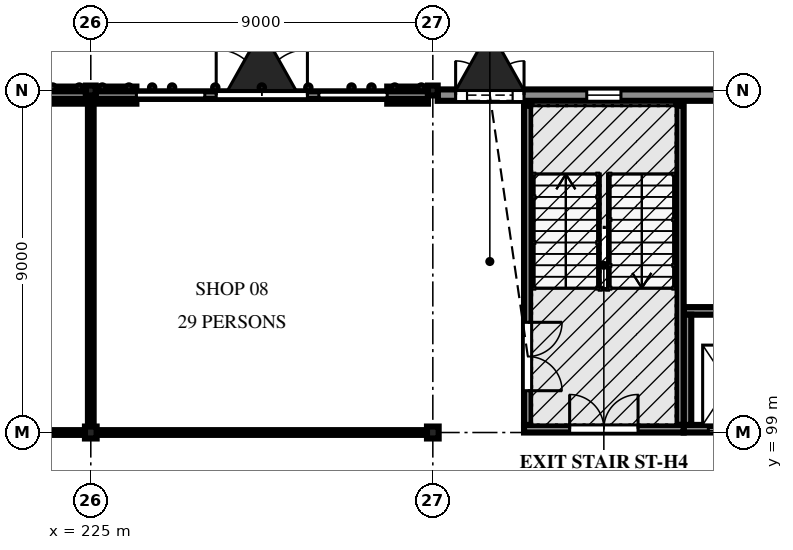
"""IFC4 building model, lengths in metres.
Left out: names, types, materials, properties, quantities, classifications, styles, units other than length and angle.
Written with IfcOpenShell. Run it as: python <this file> out.ifc"""

import sys

from ifc_helpers import new_model, si_unit, direction, frame, frame_2d, origin, origin_2d, place, context, subcontext, project, spatial, polyline, rectangle, i_section, outline, extrude, element, fill, save


model = new_model("IFC4")
c1 = context("Model", 3, precision=1e-05, world=origin(), true_north=direction((0.0, 1.0)))
c2 = subcontext(c1, "Body", "Model", "MODEL_VIEW")
j1 = project(units=[si_unit("LENGTHUNIT", "METRE"), si_unit("PLANEANGLEUNIT", "RADIAN")], contexts=[c1])
p1 = place(None, origin())
s1 = spatial("IfcSite", under=j1, at=p1, CompositionType="ELEMENT")
p2 = place(p1, origin())
s2 = spatial("IfcBuilding", under=s1, at=p2, CompositionType="ELEMENT")
p3 = place(p2, origin())
s3 = spatial("IfcBuildingStorey", under=s2, at=p3, CompositionType="ELEMENT", Elevation=0.0)
p4 = place(p3, frame((225.0, 99.0, -2.1), z_axis=(0.0, 0.0, 1.0), x_axis=(1.0, 0.0, 0.0)))
e1 = element("IfcColumn", 1, at=p4, inside=s3, PredefinedType="COLUMN", context=c2, shape_type="SweptSolid", body=[
    extrude(i_section(OverallWidth=0.307, OverallDepth=0.314, WebThickness=0.012, FlangeThickness=0.019, FilletRadius=0.015, at=origin_2d()), origin(), (0.0, 0.0, 1.0), 9.6),
])
p5 = place(p3, frame((225.0, 108.0, -2.1), z_axis=(0.0, 0.0, 1.0), x_axis=(1.0, 0.0, 0.0)))
e2 = element("IfcColumn", 2, at=p5, inside=s3, PredefinedType="COLUMN", context=c2, shape_type="SweptSolid", body=[
    extrude(i_section(OverallWidth=0.256, OverallDepth=0.26, WebThickness=0.01, FlangeThickness=0.017, FilletRadius=0.013, at=origin_2d()), origin(), (0.0, 0.0, 1.0), 9.6),
])
p6 = place(p3, frame((234.0, 99.0, -2.1), z_axis=(0.0, 0.0, 1.0), x_axis=(1.0, 0.0, 0.0)))
e3 = element("IfcColumn", 3, at=p6, inside=s3, PredefinedType="COLUMN", context=c2, shape_type="SweptSolid", body=[
    extrude(i_section(OverallWidth=0.307, OverallDepth=0.314, WebThickness=0.012, FlangeThickness=0.019, FilletRadius=0.015, at=origin_2d()), origin(), (0.0, 0.0, 1.0), 9.6),
])
p7 = place(p3, frame((234.0, 108.0, -2.1), z_axis=(0.0, 0.0, 1.0), x_axis=(1.0, 0.0, 0.0)))
e4 = element("IfcColumn", 4, at=p7, inside=s3, PredefinedType="COLUMN", context=c2, shape_type="SweptSolid", body=[
    extrude(i_section(OverallWidth=0.256, OverallDepth=0.26, WebThickness=0.01, FlangeThickness=0.017, FilletRadius=0.013, at=origin_2d()), origin(), (0.0, 0.0, 1.0), 9.6),
])
p8 = place(p3, frame((223.8, 107.878, 0.0), z_axis=(0.0, 0.0, 1.0), x_axis=(1.0, 0.0, 0.0)))
e5 = element("IfcWall", 5, at=p8, inside=s3, PredefinedType="SOLIDWALL", context=c2, shape_type="SweptSolid", body=[
    extrude(rectangle(XDim=1.072, YDim=0.45, at=frame_2d((0.536, 0.0))), origin(), (0.0, 0.0, 1.0), 4.5),
])
p9 = place(p3, frame((216.128, 107.878, 4.9), z_axis=(0.0, 0.0, 1.0), x_axis=(1.0, 0.0, 0.0)))
e6 = element("IfcWall", 6, at=p9, inside=s3, PredefinedType="SOLIDWALL", context=c2, shape_type="SweptSolid", body=[
    extrude(rectangle(XDim=8.744, YDim=0.2, at=frame_2d((4.372, 0.0))), origin(), (0.0, 0.0, 1.0), 1.792),
])
p10 = place(p3, frame((225.128, 107.878, 0.0), z_axis=(0.0, 0.0, 1.0), x_axis=(1.0, 0.0, 0.0)))
e7 = element("IfcWall", 7, at=p10, inside=s3, PredefinedType="SOLIDWALL", context=c2, shape_type="SweptSolid", body=[
    extrude(rectangle(XDim=1.072, YDim=0.45, at=frame_2d((0.536, 0.0))), origin(), (0.0, 0.0, 1.0), 4.5),
])
p11 = place(p3, frame((228.0, 107.878, 0.0), z_axis=(0.0, 0.0, 1.0), x_axis=(1.0, 0.0, 0.0)))
e8 = element("IfcWall", 8, at=p11, inside=s3, PredefinedType="ELEMENTEDWALL", context=c2, shape_type="SweptSolid", body=[
    extrude(rectangle(XDim=3.0, YDim=0.15, at=frame_2d((1.5, 0.0))), origin(), (0.0, 0.0, 1.0), 4.5),
])
p12 = place(p11, frame((0.3, 0.0, 0.0)))
e9 = element("IfcOpeningElement", 9, at=p12, cuts=e8, PredefinedType="OPENING", context=c2, shape_type="SweptSolid", body=[
    extrude(rectangle(XDim=2.4, YDim=2.7, at=frame_2d((1.2, 1.35))), frame((0.0, 0.085, 0.0), z_axis=(0.0, -1.0, 0.0), x_axis=(1.0, 0.0, 0.0)), (0.0, 0.0, 1.0), 0.17),
])
p13 = place(p3, frame((232.8, 107.878, 0.0), z_axis=(0.0, 0.0, 1.0), x_axis=(1.0, 0.0, 0.0)))
e10 = element("IfcWall", 10, at=p13, inside=s3, PredefinedType="SOLIDWALL", context=c2, shape_type="SweptSolid", body=[
    extrude(rectangle(XDim=1.072, YDim=0.45, at=frame_2d((0.536, 0.0))), origin(), (0.0, 0.0, 1.0), 4.5),
])
p14 = place(p3, frame((225.128, 107.878, 4.9), z_axis=(0.0, 0.0, 1.0), x_axis=(1.0, 0.0, 0.0)))
e11 = element("IfcWall", 11, at=p14, inside=s3, PredefinedType="SOLIDWALL", context=c2, shape_type="SweptSolid", body=[
    extrude(rectangle(XDim=8.744, YDim=0.2, at=frame_2d((4.372, 0.0))), origin(), (0.0, 0.0, 1.0), 1.792),
])
p15 = place(p3, frame((234.128, 107.878, 0.0), z_axis=(0.0, 0.0, 1.0), x_axis=(1.0, 0.0, 0.0)))
e12 = element("IfcWall", 12, at=p15, inside=s3, PredefinedType="SOLIDWALL", context=c2, shape_type="SweptSolid", body=[
    extrude(rectangle(XDim=8.744, YDim=0.3, at=frame_2d((4.372, 0.0))), origin(), (0.0, 0.0, 1.0), 6.692),
])
p16 = place(p15, frame((0.472, 0.0, 0.0)))
e13 = element("IfcOpeningElement", 13, at=p16, cuts=e12, PredefinedType="OPENING", context=c2, shape_type="SweptSolid", body=[
    extrude(rectangle(XDim=1.8, YDim=2.4, at=frame_2d((0.9, 1.2))), frame((0.0, 0.16, 0.0), z_axis=(0.0, -1.0, 0.0), x_axis=(1.0, 0.0, 0.0)), (0.0, 0.0, 1.0), 0.32),
])
p17 = place(p15, frame((0.772, 0.0, 2.55)))
e14 = element("IfcOpeningElement", 14, at=p17, cuts=e12, PredefinedType="OPENING", context=c2, shape_type="SweptSolid", body=[
    extrude(rectangle(XDim=1.2, YDim=0.6, at=frame_2d((0.6, 0.3))), frame((0.0, 0.16, 0.0), z_axis=(0.0, -1.0, 0.0), x_axis=(1.0, 0.0, 0.0)), (0.0, 0.0, 1.0), 0.32),
])
p18 = place(p15, frame((3.922, 0.0, 1.2)))
e15 = element("IfcOpeningElement", 15, at=p18, cuts=e12, PredefinedType="OPENING", context=c2, shape_type="SweptSolid", body=[
    extrude(rectangle(XDim=0.9, YDim=1.8, at=frame_2d((0.45, 0.9))), frame((0.0, 0.16, 0.0), z_axis=(0.0, -1.0, 0.0), x_axis=(1.0, 0.0, 0.0)), (0.0, 0.0, 1.0), 0.32),
])
p19 = place(p3, frame((236.4, 99.1, 0.0), z_axis=(0.0, 0.0, 1.0), x_axis=(1.0, 0.0, 0.0)))
e16 = element("IfcWall", 16, at=p19, inside=s3, PredefinedType="SOLIDWALL", context=c2, shape_type="SweptSolid", body=[
    extrude(rectangle(XDim=4.2, YDim=0.2, at=frame_2d((2.1, 0.0))), origin(), (0.0, 0.0, 1.0), 6.757),
])
p20 = place(p19, frame((1.2, 0.0, 0.0)))
e17 = element("IfcOpeningElement", 17, at=p20, cuts=e16, PredefinedType="OPENING", context=c2, shape_type="SweptSolid", body=[
    extrude(rectangle(XDim=1.8, YDim=2.1, at=frame_2d((0.9, 1.05))), frame((0.0, 0.11, 0.0), z_axis=(0.0, -1.0, 0.0), x_axis=(1.0, 0.0, 0.0)), (0.0, 0.0, 1.0), 0.22),
])
p21 = place(p3, frame((236.5, 99.2, 0.0), z_axis=(0.0, 0.0, 1.0), x_axis=(0.0, 1.0, 0.0)))
e18 = element("IfcWall", 18, at=p21, inside=s3, PredefinedType="SOLIDWALL", context=c2, shape_type="SweptSolid", body=[
    extrude(rectangle(XDim=8.4, YDim=0.2, at=frame_2d((4.2, 0.0))), origin(), (0.0, 0.0, 1.0), 6.757),
])
p22 = place(p21, frame((0.9, 0.0, 0.0)))
e19 = element("IfcOpeningElement", 19, at=p22, cuts=e18, PredefinedType="OPENING", context=c2, shape_type="SweptSolid", body=[
    extrude(rectangle(XDim=1.8, YDim=2.1, at=frame_2d((0.9, 1.05))), frame((0.0, 0.11, 0.0), z_axis=(0.0, -1.0, 0.0), x_axis=(1.0, 0.0, 0.0)), (0.0, 0.0, 1.0), 0.22),
])
p23 = place(p3, frame((240.5, 99.2, 0.0), z_axis=(0.0, 0.0, 1.0), x_axis=(0.0, 1.0, 0.0)))
e20 = element("IfcWall", 20, at=p23, inside=s3, PredefinedType="SOLIDWALL", context=c2, shape_type="SweptSolid", body=[
    extrude(rectangle(XDim=8.4, YDim=0.2, at=frame_2d((4.2, 0.0))), origin(), (0.0, 0.0, 1.0), 6.757),
])
p24 = place(p3, frame((240.602, 99.1, -1.6), z_axis=(0.0, 0.0, 1.0), x_axis=(1.0, 0.0, 0.0)))
e21 = element("IfcWall", 21, at=p24, inside=s3, PredefinedType="SOLIDWALL", context=c2, shape_type="SweptSolid", body=[
    extrude(rectangle(XDim=2.398, YDim=0.2, at=frame_2d((1.199, 0.0))), origin(), (0.0, 0.0, 1.0), 8.357),
])
p25 = place(p24, frame((0.648, 0.0, 1.6)))
e22 = element("IfcOpeningElement", 22, at=p25, cuts=e21, PredefinedType="OPENING", context=c2, shape_type="SweptSolid", body=[
    extrude(rectangle(XDim=1.1, YDim=2.1, at=frame_2d((0.55, 1.05))), frame((0.0, 0.11, 0.0), z_axis=(0.0, -1.0, 0.0), x_axis=(1.0, 0.0, 0.0)), (0.0, 0.0, 1.0), 0.22),
])
p26 = place(p3, frame((240.602, 102.2, -1.6), z_axis=(0.0, 0.0, 1.0), x_axis=(1.0, 0.0, 0.0)))
e23 = element("IfcWall", 23, at=p26, inside=s3, PredefinedType="SOLIDWALL", context=c2, shape_type="SweptSolid", body=[
    extrude(rectangle(XDim=2.256, YDim=0.2, at=frame_2d((1.128, 0.0))), origin(), (0.0, 0.0, 1.0), 8.357),
])
p27 = place(p3, frame((240.7, 99.2, -1.6), z_axis=(0.0, 0.0, 1.0), x_axis=(0.0, 1.0, 0.0)))
e24 = element("IfcWall", 24, at=p27, inside=s3, PredefinedType="SOLIDWALL", context=c2, shape_type="SweptSolid", body=[
    extrude(rectangle(XDim=2.9, YDim=0.2, at=frame_2d((1.45, 0.0))), origin(), (0.0, 0.0, 1.0), 8.357),
])
for number, where, z_axis, x_axis in (
    (25, (225.154, 99.0, 0.0), (0.0, 0.0, 1.0), (1.0, 0.0, 0.0)),
    (26, (216.154, 99.0, 0.0), (0.0, 0.0, 1.0), (1.0, 0.0, 0.0)),
):
    element("IfcWall", number, at=place(p3, frame(where, z_axis=z_axis, x_axis=x_axis)), inside=s3, PredefinedType="PARTITIONING", context=c2, shape_type="SweptSolid", body=[
        extrude(rectangle(XDim=8.692, YDim=0.125, at=frame_2d((4.346, 0.0))), origin(), (0.0, 0.0, 1.0), 6.757),
    ])
p28 = place(p3, frame((225.0, 107.87, 0.0), z_axis=(0.0, 0.0, 1.0), x_axis=(0.0, -1.0, 0.0)))
e27 = element("IfcWall", 27, at=p28, inside=s3, PredefinedType="PARTITIONING", context=c2, shape_type="SweptSolid", body=[
    extrude(rectangle(XDim=8.713, YDim=0.15, at=frame_2d((4.356, 0.0))), origin(), (0.0, 0.0, 1.0), 6.6),
])
p29 = place(p12, origin())
e28 = element("IfcDoor", 28, at=p29, inside=s3, OperationType="DOUBLE_DOOR_SINGLE_SWING", PredefinedType="DOOR", context=c2, shape_type="SweptSolid", body=[
    extrude(outline(polyline([(0.0, 0.0), (0.07, 0.0), (0.07, 2.63), (2.33, 2.63), (2.33, 0.0), (2.4, 0.0), (2.4, 2.7), (0.0, 2.7), (0.0, 0.0)])), frame((0.0, 0.025, 0.0), z_axis=(0.0, -1.0, 0.0), x_axis=(1.0, 0.0, 0.0)), (0.0, 0.0, 1.0), 0.05),
    extrude(outline(polyline([(0.074, 0.01), (1.197, 0.01), (1.197, 2.626), (0.074, 2.626), (0.074, 0.01)]), holes=[polyline([(0.164, 0.31), (1.107, 0.31), (1.107, 2.536), (0.164, 2.536), (0.164, 0.31)])]), frame((0.0, 0.017, 0.0), z_axis=(0.0, -1.0, 0.0), x_axis=(1.0, 0.0, 0.0)), (0.0, 0.0, 1.0), 0.035),
    extrude(rectangle(XDim=0.943, YDim=2.226, at=frame_2d((0.635, 1.423))), frame((0.0, 0.006, 0.0), z_axis=(0.0, -1.0, 0.0), x_axis=(1.0, 0.0, 0.0)), (0.0, 0.0, 1.0), 0.012),
    extrude(outline(polyline([(1.203, 0.01), (2.326, 0.01), (2.326, 2.626), (1.203, 2.626), (1.203, 0.01)]), holes=[polyline([(1.293, 0.31), (2.236, 0.31), (2.236, 2.536), (1.293, 2.536), (1.293, 0.31)])]), frame((0.0, 0.017, 0.0), z_axis=(0.0, -1.0, 0.0), x_axis=(1.0, 0.0, 0.0)), (0.0, 0.0, 1.0), 0.035),
    extrude(rectangle(XDim=0.943, YDim=2.226, at=frame_2d((1.764, 1.423))), frame((0.0, 0.006, 0.0), z_axis=(0.0, -1.0, 0.0), x_axis=(1.0, 0.0, 0.0)), (0.0, 0.0, 1.0), 0.012),
])
fill(e9, e28)
p30 = place(p16, origin())
e29 = element("IfcDoor", 29, at=p30, inside=s3, OperationType="DOUBLE_DOOR_SINGLE_SWING", PredefinedType="DOOR", context=c2, shape_type="SweptSolid", body=[
    extrude(outline(polyline([(0.0, 0.0), (0.07, 0.0), (0.07, 2.33), (1.73, 2.33), (1.73, 0.0), (1.8, 0.0), (1.8, 2.4), (0.0, 2.4), (0.0, 0.0)])), frame((0.0, 0.025, 0.0), z_axis=(0.0, -1.0, 0.0), x_axis=(1.0, 0.0, 0.0)), (0.0, 0.0, 1.0), 0.05),
    extrude(outline(polyline([(0.074, 0.01), (0.897, 0.01), (0.897, 2.326), (0.074, 2.326), (0.074, 0.01)]), holes=[polyline([(0.194, 0.16), (0.777, 0.16), (0.777, 1.01), (0.194, 1.01), (0.194, 0.16)]), polyline([(0.335, 1.16), (0.635, 1.16), (0.635, 1.76), (0.335, 1.76), (0.335, 1.16)])]), frame((0.0, 0.017, 0.0), z_axis=(0.0, -1.0, 0.0), x_axis=(1.0, 0.0, 0.0)), (0.0, 0.0, 1.0), 0.035),
    extrude(rectangle(XDim=0.583, YDim=0.85, at=frame_2d((0.485, 0.585))), frame((0.0, 0.009, 0.0), z_axis=(0.0, -1.0, 0.0), x_axis=(1.0, 0.0, 0.0)), (0.0, 0.0, 1.0), 0.017),
    extrude(rectangle(XDim=0.3, YDim=0.6, at=frame_2d((0.485, 1.46))), frame((0.0, 0.006, 0.0), z_axis=(0.0, -1.0, 0.0), x_axis=(1.0, 0.0, 0.0)), (0.0, 0.0, 1.0), 0.012),
    extrude(outline(polyline([(0.903, 0.01), (1.726, 0.01), (1.726, 2.326), (0.903, 2.326), (0.903, 0.01)]), holes=[polyline([(1.023, 0.16), (1.606, 0.16), (1.606, 1.01), (1.023, 1.01), (1.023, 0.16)]), polyline([(1.165, 1.16), (1.465, 1.16), (1.465, 1.76), (1.165, 1.76), (1.165, 1.16)])]), frame((0.0, 0.017, 0.0), z_axis=(0.0, -1.0, 0.0), x_axis=(1.0, 0.0, 0.0)), (0.0, 0.0, 1.0), 0.035),
    extrude(rectangle(XDim=0.583, YDim=0.85, at=frame_2d((1.314, 0.585))), frame((0.0, 0.009, 0.0), z_axis=(0.0, -1.0, 0.0), x_axis=(1.0, 0.0, 0.0)), (0.0, 0.0, 1.0), 0.017),
    extrude(rectangle(XDim=0.3, YDim=0.6, at=frame_2d((1.314, 1.46))), frame((0.0, 0.006, 0.0), z_axis=(0.0, -1.0, 0.0), x_axis=(1.0, 0.0, 0.0)), (0.0, 0.0, 1.0), 0.012),
])
fill(e13, e29)
p31 = place(p17, origin())
e30 = element("IfcWindow", 30, at=p31, inside=s3, PartitioningType="SINGLE_PANEL", PredefinedType="WINDOW", context=c2, shape_type="SweptSolid", body=[
    extrude(outline(polyline([(0.0, 0.0), (1.2, 0.0), (1.2, 0.6), (0.0, 0.6), (0.0, 0.0)]), holes=[polyline([(0.07, 0.07), (1.13, 0.07), (1.13, 0.53), (0.07, 0.53), (0.07, 0.07)])]), frame((0.0, 0.03, 0.0), z_axis=(0.0, -1.0, 0.0), x_axis=(1.0, 0.0, 0.0)), (0.0, 0.0, 1.0), 0.06),
    extrude(outline(polyline([(0.07, 0.07), (1.13, 0.07), (1.13, 0.53), (0.07, 0.53), (0.07, 0.07)]), holes=[polyline([(0.1, 0.1), (1.1, 0.1), (1.1, 0.5), (0.1, 0.5), (0.1, 0.1)])]), frame((0.0, 0.022, 0.0), z_axis=(0.0, -1.0, 0.0), x_axis=(1.0, 0.0, 0.0)), (0.0, 0.0, 1.0), 0.045),
    extrude(rectangle(XDim=1.0, YDim=0.4, at=frame_2d((0.6, 0.3))), frame((0.0, 0.006, 0.0), z_axis=(0.0, -1.0, 0.0), x_axis=(1.0, 0.0, 0.0)), (0.0, 0.0, 1.0), 0.012),
])
fill(e14, e30)
p32 = place(p18, origin())
e31 = element("IfcWindow", 31, at=p32, inside=s3, PartitioningType="SINGLE_PANEL", PredefinedType="WINDOW", context=c2, shape_type="SweptSolid", body=[
    extrude(outline(polyline([(0.0, 0.0), (0.9, 0.0), (0.9, 1.8), (0.0, 1.8), (0.0, 0.0)]), holes=[polyline([(0.07, 0.07), (0.83, 0.07), (0.83, 1.73), (0.07, 1.73), (0.07, 0.07)])]), frame((0.0, 0.03, 0.0), z_axis=(0.0, -1.0, 0.0), x_axis=(1.0, 0.0, 0.0)), (0.0, 0.0, 1.0), 0.06),
    extrude(outline(polyline([(0.07, 0.07), (0.83, 0.07), (0.83, 1.73), (0.07, 1.73), (0.07, 0.07)]), holes=[polyline([(0.1, 0.1), (0.8, 0.1), (0.8, 1.7), (0.1, 1.7), (0.1, 0.1)])]), frame((0.0, 0.022, 0.0), z_axis=(0.0, -1.0, 0.0), x_axis=(1.0, 0.0, 0.0)), (0.0, 0.0, 1.0), 0.045),
    extrude(rectangle(XDim=0.7, YDim=1.6, at=frame_2d((0.45, 0.9))), frame((0.0, 0.006, 0.0), z_axis=(0.0, -1.0, 0.0), x_axis=(1.0, 0.0, 0.0)), (0.0, 0.0, 1.0), 0.012),
])
fill(e15, e31)
p33 = place(p25, origin())
e32 = element("IfcDoor", 32, at=p33, inside=s3, OperationType="SLIDING_TO_LEFT", PredefinedType="DOOR", context=c2, shape_type="SweptSolid", body=[
    extrude(outline(polyline([(0.0, 0.0), (0.07, 0.0), (0.07, 2.03), (1.03, 2.03), (1.03, 0.0), (1.1, 0.0), (1.1, 2.1), (0.0, 2.1), (0.0, 0.0)])), frame((0.0, 0.025, 0.0), z_axis=(0.0, -1.0, 0.0), x_axis=(1.0, 0.0, 0.0)), (0.0, 0.0, 1.0), 0.05),
    extrude(rectangle(XDim=0.524, YDim=2.016, at=frame_2d((0.336, 1.018))), frame((0.0, 0.018, 0.0), z_axis=(0.0, -1.0, 0.0), x_axis=(1.0, 0.0, 0.0)), (0.0, 0.0, 1.0), 0.016),
    extrude(rectangle(XDim=0.52, YDim=2.016, at=frame_2d((0.766, 1.018))), frame((0.0, -0.002, 0.0), z_axis=(0.0, -1.0, 0.0), x_axis=(1.0, 0.0, 0.0)), (0.0, 0.0, 1.0), 0.016),
])
fill(e22, e32)
p34 = place(p22, frame((1.8, 0.0, 0.0), z_axis=(0.0, 0.0, 1.0), x_axis=(-1.0, 0.0, 0.0)))
e33 = element("IfcDoor", 33, at=p34, inside=s3, OperationType="DOUBLE_DOOR_SINGLE_SWING", PredefinedType="DOOR", context=c2, shape_type="SweptSolid", body=[
    extrude(outline(polyline([(0.0, 0.0), (0.07, 0.0), (0.07, 2.03), (1.73, 2.03), (1.73, 0.0), (1.8, 0.0), (1.8, 2.1), (0.0, 2.1), (0.0, 0.0)])), frame((0.0, 0.025, 0.0), z_axis=(0.0, -1.0, 0.0), x_axis=(1.0, 0.0, 0.0)), (0.0, 0.0, 1.0), 0.05),
    extrude(outline(polyline([(0.074, 0.01), (0.897, 0.01), (0.897, 2.026), (0.074, 2.026), (0.074, 0.01)]), holes=[polyline([(0.194, 0.16), (0.777, 0.16), (0.777, 1.01), (0.194, 1.01), (0.194, 0.16)]), polyline([(0.335, 1.16), (0.635, 1.16), (0.635, 1.76), (0.335, 1.76), (0.335, 1.16)])]), frame((0.0, 0.017, 0.0), z_axis=(0.0, -1.0, 0.0), x_axis=(1.0, 0.0, 0.0)), (0.0, 0.0, 1.0), 0.035),
    extrude(rectangle(XDim=0.583, YDim=0.85, at=frame_2d((0.485, 0.585))), frame((0.0, 0.009, 0.0), z_axis=(0.0, -1.0, 0.0), x_axis=(1.0, 0.0, 0.0)), (0.0, 0.0, 1.0), 0.017),
    extrude(rectangle(XDim=0.3, YDim=0.6, at=frame_2d((0.485, 1.46))), frame((0.0, 0.006, 0.0), z_axis=(0.0, -1.0, 0.0), x_axis=(1.0, 0.0, 0.0)), (0.0, 0.0, 1.0), 0.012),
    extrude(outline(polyline([(0.903, 0.01), (1.726, 0.01), (1.726, 2.026), (0.903, 2.026), (0.903, 0.01)]), holes=[polyline([(1.023, 0.16), (1.606, 0.16), (1.606, 1.01), (1.023, 1.01), (1.023, 0.16)]), polyline([(1.165, 1.16), (1.465, 1.16), (1.465, 1.76), (1.165, 1.76), (1.165, 1.16)])]), frame((0.0, 0.017, 0.0), z_axis=(0.0, -1.0, 0.0), x_axis=(1.0, 0.0, 0.0)), (0.0, 0.0, 1.0), 0.035),
    extrude(rectangle(XDim=0.583, YDim=0.85, at=frame_2d((1.314, 0.585))), frame((0.0, 0.009, 0.0), z_axis=(0.0, -1.0, 0.0), x_axis=(1.0, 0.0, 0.0)), (0.0, 0.0, 1.0), 0.017),
    extrude(rectangle(XDim=0.3, YDim=0.6, at=frame_2d((1.314, 1.46))), frame((0.0, 0.006, 0.0), z_axis=(0.0, -1.0, 0.0), x_axis=(1.0, 0.0, 0.0)), (0.0, 0.0, 1.0), 0.012),
])
fill(e19, e33)
p35 = place(p20, origin())
e34 = element("IfcDoor", 34, at=p35, inside=s3, OperationType="DOUBLE_DOOR_SINGLE_SWING", PredefinedType="DOOR", context=c2, shape_type="SweptSolid", body=[
    extrude(outline(polyline([(0.0, 0.0), (0.07, 0.0), (0.07, 2.03), (1.73, 2.03), (1.73, 0.0), (1.8, 0.0), (1.8, 2.1), (0.0, 2.1), (0.0, 0.0)])), frame((0.0, 0.025, 0.0), z_axis=(0.0, -1.0, 0.0), x_axis=(1.0, 0.0, 0.0)), (0.0, 0.0, 1.0), 0.05),
    extrude(outline(polyline([(0.074, 0.01), (0.897, 0.01), (0.897, 2.026), (0.074, 2.026), (0.074, 0.01)]), holes=[polyline([(0.194, 0.16), (0.777, 0.16), (0.777, 1.01), (0.194, 1.01), (0.194, 0.16)]), polyline([(0.335, 1.16), (0.635, 1.16), (0.635, 1.76), (0.335, 1.76), (0.335, 1.16)])]), frame((0.0, 0.017, 0.0), z_axis=(0.0, -1.0, 0.0), x_axis=(1.0, 0.0, 0.0)), (0.0, 0.0, 1.0), 0.035),
    extrude(rectangle(XDim=0.583, YDim=0.85, at=frame_2d((0.485, 0.585))), frame((0.0, 0.009, 0.0), z_axis=(0.0, -1.0, 0.0), x_axis=(1.0, 0.0, 0.0)), (0.0, 0.0, 1.0), 0.017),
    extrude(rectangle(XDim=0.3, YDim=0.6, at=frame_2d((0.485, 1.46))), frame((0.0, 0.006, 0.0), z_axis=(0.0, -1.0, 0.0), x_axis=(1.0, 0.0, 0.0)), (0.0, 0.0, 1.0), 0.012),
    extrude(outline(polyline([(0.903, 0.01), (1.726, 0.01), (1.726, 2.026), (0.903, 2.026), (0.903, 0.01)]), holes=[polyline([(1.023, 0.16), (1.606, 0.16), (1.606, 1.01), (1.023, 1.01), (1.023, 0.16)]), polyline([(1.165, 1.16), (1.465, 1.16), (1.465, 1.76), (1.165, 1.76), (1.165, 1.16)])]), frame((0.0, 0.017, 0.0), z_axis=(0.0, -1.0, 0.0), x_axis=(1.0, 0.0, 0.0)), (0.0, 0.0, 1.0), 0.035),
    extrude(rectangle(XDim=0.583, YDim=0.85, at=frame_2d((1.314, 0.585))), frame((0.0, 0.009, 0.0), z_axis=(0.0, -1.0, 0.0), x_axis=(1.0, 0.0, 0.0)), (0.0, 0.0, 1.0), 0.017),
    extrude(rectangle(XDim=0.3, YDim=0.6, at=frame_2d((1.314, 1.46))), frame((0.0, 0.006, 0.0), z_axis=(0.0, -1.0, 0.0), x_axis=(1.0, 0.0, 0.0)), (0.0, 0.0, 1.0), 0.012),
])
fill(e17, e34)
save(model, sys.argv[1])
